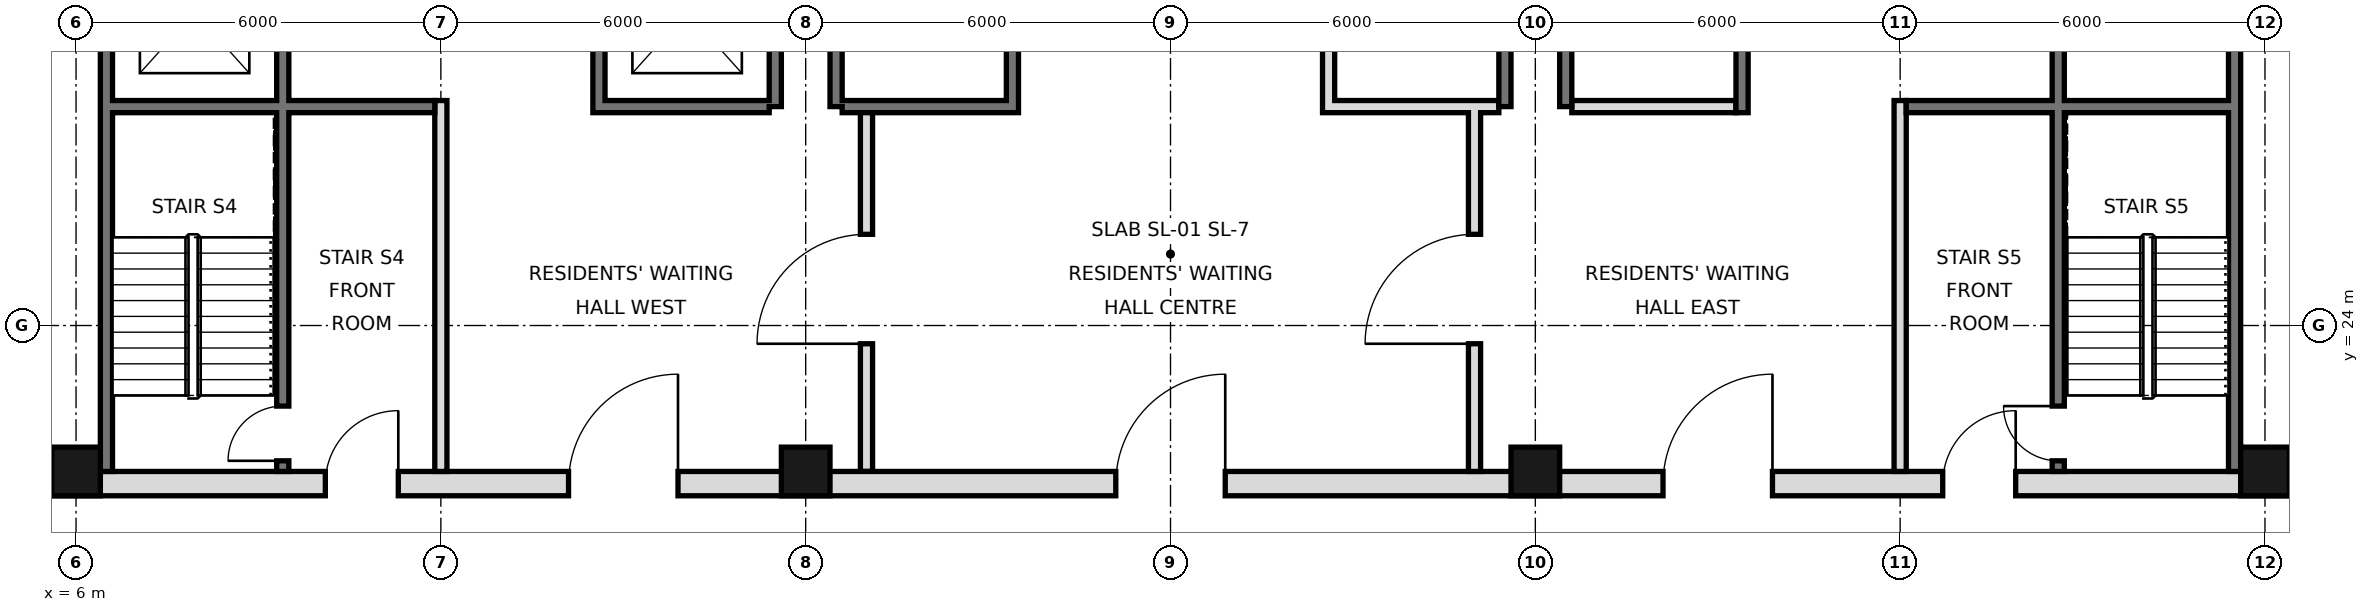
"""IFC4 building model, lengths in metres.
Left out: names, types, materials, properties, quantities, classifications, styles, units other than length and angle.
Written with IfcOpenShell. Run it as: python <this file> out.ifc"""

import sys

from ifc_helpers import new_model, si_unit, direction, frame, frame_2d, origin, origin_2d, place, context, subcontext, project, spatial, rectangle, hollow_rectangle, extrude, element, fill, save


model = new_model("IFC4")
c1 = context("Model", 3, precision=1e-05, world=origin(), true_north=direction((0.0, 1.0)))
c2 = subcontext(c1, "Body", "Model", "MODEL_VIEW")
j1 = project(units=[si_unit("LENGTHUNIT", "METRE"), si_unit("PLANEANGLEUNIT", "RADIAN")], contexts=[c1])
p1 = place(None, origin())
s1 = spatial("IfcSite", under=j1, at=p1, CompositionType="ELEMENT")
p2 = place(p1, origin())
s2 = spatial("IfcBuilding", under=s1, at=p2, CompositionType="ELEMENT")
p3 = place(p2, frame((0.0, 0.0, 53.4)))
s3 = spatial("IfcBuildingStorey", under=s2, at=p3, CompositionType="ELEMENT", Elevation=53.4)
for number, where, z_axis, x_axis in (
    (1, (6.0, 21.6, 0.0), (0.0, 0.0, 1.0), (1.0, 0.0, 0.0)),
    (2, (18.0, 21.6, 0.0), (0.0, 0.0, 1.0), (1.0, 0.0, 0.0)),
    (3, (30.0, 21.6, 0.0), (0.0, 0.0, 1.0), (1.0, 0.0, 0.0)),
    (4, (42.0, 21.6, 0.0), (0.0, 0.0, 1.0), (1.0, 0.0, 0.0)),
):
    element("IfcColumn", number, at=place(p3, frame(where, z_axis=z_axis, x_axis=x_axis)), inside=s3, PredefinedType="COLUMN", context=c2, shape_type="SweptSolid", body=[
        extrude(hollow_rectangle(XDim=0.8, YDim=0.8, WallThickness=0.06, at=origin_2d()), origin(), (0.0, 0.0, 1.0), 3.6),
    ])
for number, where, z_axis, x_axis in (
    (5, (6.5, 21.6, 0.0), (0.0, 0.0, 1.0), (0.0, 1.0, 0.0)),
    (6, (41.5, 21.6, 0.0), (0.0, 0.0, 1.0), (0.0, 1.0, 0.0)),
):
    element("IfcWall", number, at=place(p3, frame(where, z_axis=z_axis, x_axis=x_axis)), inside=s3, PredefinedType="SOLIDWALL", context=c2, shape_type="SweptSolid", body=[
        extrude(rectangle(XDim=23.5, YDim=0.2, at=frame_2d((11.75, 0.0))), origin(), (0.0, 0.0, 1.0), 3.42),
    ])
for number, where, z_axis, x_axis in (
    (7, (17.5, 27.6, 0.0), (0.0, 0.0, 1.0), (0.0, 1.0, 0.0)),
    (8, (18.5, 27.6, 0.0), (0.0, 0.0, 1.0), (0.0, 1.0, 0.0)),
    (9, (29.5, 27.6, 0.0), (0.0, 0.0, 1.0), (0.0, 1.0, 0.0)),
    (10, (30.5, 27.6, 0.0), (0.0, 0.0, 1.0), (0.0, 1.0, 0.0)),
):
    element("IfcWall", number, at=place(p3, frame(where, z_axis=z_axis, x_axis=x_axis)), inside=s3, PredefinedType="SOLIDWALL", context=c2, shape_type="SweptSolid", body=[
        extrude(rectangle(XDim=17.5, YDim=0.2, at=frame_2d((8.75, 0.0))), origin(), (0.0, 0.0, 1.0), 3.42),
    ])
p4 = place(p3, frame((5.6, 21.4, 0.0), z_axis=(0.0, 0.0, 1.0), x_axis=(1.0, 0.0, 0.0)))
e11 = element("IfcWall", 11, at=p4, inside=s3, PredefinedType="SOLIDWALL", context=c2, shape_type="SweptSolid", body=[
    extrude(rectangle(XDim=36.8, YDim=0.4, at=frame_2d((18.4, 0.0))), origin(), (0.0, 0.0, 1.0), 3.42),
])
p5 = place(p4, frame((8.5, 0.0, 0.0)))
e12 = element("IfcOpeningElement", 12, at=p5, cuts=e11, PredefinedType="OPENING", context=c2, shape_type="SweptSolid", body=[
    extrude(rectangle(XDim=1.8, YDim=2.1, at=frame_2d((0.9, 1.05))), frame((0.0, 0.21, 0.0), z_axis=(0.0, -1.0, 0.0), x_axis=(1.0, 0.0, 0.0)), (0.0, 0.0, 1.0), 0.42),
])
p6 = place(p4, frame((17.5, 0.0, 0.0)))
e13 = element("IfcOpeningElement", 13, at=p6, cuts=e11, PredefinedType="OPENING", context=c2, shape_type="SweptSolid", body=[
    extrude(rectangle(XDim=1.8, YDim=2.1, at=frame_2d((0.9, 1.05))), frame((0.0, 0.21, 0.0), z_axis=(0.0, -1.0, 0.0), x_axis=(1.0, 0.0, 0.0)), (0.0, 0.0, 1.0), 0.42),
])
p7 = place(p4, frame((26.5, 0.0, 0.0)))
e14 = element("IfcOpeningElement", 14, at=p7, cuts=e11, PredefinedType="OPENING", context=c2, shape_type="SweptSolid", body=[
    extrude(rectangle(XDim=1.8, YDim=2.1, at=frame_2d((0.9, 1.05))), frame((0.0, 0.21, 0.0), z_axis=(0.0, -1.0, 0.0), x_axis=(1.0, 0.0, 0.0)), (0.0, 0.0, 1.0), 0.42),
])
p8 = place(p4, frame((4.5, 0.0, 0.0)))
e15 = element("IfcOpeningElement", 15, at=p8, cuts=e11, PredefinedType="OPENING", context=c2, shape_type="SweptSolid", body=[
    extrude(rectangle(XDim=1.2, YDim=2.1, at=frame_2d((0.6, 1.05))), frame((0.0, 0.21, 0.0), z_axis=(0.0, -1.0, 0.0), x_axis=(1.0, 0.0, 0.0)), (0.0, 0.0, 1.0), 0.42),
])
p9 = place(p4, frame((31.1, 0.0, 0.0)))
e16 = element("IfcOpeningElement", 16, at=p9, cuts=e11, PredefinedType="OPENING", context=c2, shape_type="SweptSolid", body=[
    extrude(rectangle(XDim=1.2, YDim=2.1, at=frame_2d((0.6, 1.05))), frame((0.0, 0.21, 0.0), z_axis=(0.0, -1.0, 0.0), x_axis=(1.0, 0.0, 0.0)), (0.0, 0.0, 1.0), 0.42),
])
p10 = place(p3, frame((19.0, 21.6, 0.0), z_axis=(0.0, 0.0, 1.0), x_axis=(0.0, 1.0, 0.0)))
e17 = element("IfcWall", 17, at=p10, inside=s3, PredefinedType="PARTITIONING", context=c2, shape_type="SweptSolid", body=[
    extrude(rectangle(XDim=6.0, YDim=0.2, at=frame_2d((3.0, 0.0))), origin(), (0.0, 0.0, 1.0), 3.42),
])
p11 = place(p10, frame((2.1, 0.0, 0.0)))
e18 = element("IfcOpeningElement", 18, at=p11, cuts=e17, PredefinedType="OPENING", context=c2, shape_type="SweptSolid", body=[
    extrude(rectangle(XDim=1.8, YDim=2.1, at=frame_2d((0.9, 1.05))), frame((0.0, 0.11, 0.0), z_axis=(0.0, -1.0, 0.0), x_axis=(1.0, 0.0, 0.0)), (0.0, 0.0, 1.0), 0.22),
])
p12 = place(p3, frame((29.0, 21.6, 0.0), z_axis=(0.0, 0.0, 1.0), x_axis=(0.0, 1.0, 0.0)))
e19 = element("IfcWall", 19, at=p12, inside=s3, PredefinedType="PARTITIONING", context=c2, shape_type="SweptSolid", body=[
    extrude(rectangle(XDim=6.0, YDim=0.2, at=frame_2d((3.0, 0.0))), origin(), (0.0, 0.0, 1.0), 3.42),
])
p13 = place(p12, frame((2.1, 0.0, 0.0)))
e20 = element("IfcOpeningElement", 20, at=p13, cuts=e19, PredefinedType="OPENING", context=c2, shape_type="SweptSolid", body=[
    extrude(rectangle(XDim=1.8, YDim=2.1, at=frame_2d((0.9, 1.05))), frame((0.0, 0.11, 0.0), z_axis=(0.0, -1.0, 0.0), x_axis=(1.0, 0.0, 0.0)), (0.0, 0.0, 1.0), 0.22),
])
p14 = place(p3, frame((12.0, 21.6, 0.0), z_axis=(0.0, 0.0, 1.0), x_axis=(0.0, 1.0, 0.0)))
e21 = element("IfcWall", 21, at=p14, inside=s3, PredefinedType="PARTITIONING", context=c2, shape_type="SweptSolid", body=[
    extrude(rectangle(XDim=6.1, YDim=0.2, at=frame_2d((3.05, 0.0))), origin(), (0.0, 0.0, 1.0), 3.42),
])
p15 = place(p3, frame((14.6, 27.5, 0.0), z_axis=(0.0, 0.0, 1.0), x_axis=(0.0, 1.0, 0.0)))
e22 = element("IfcWall", 22, at=p15, inside=s3, PredefinedType="SOLIDWALL", context=c2, shape_type="SweptSolid", body=[
    extrude(rectangle(XDim=17.5, YDim=0.2, at=frame_2d((8.75, 0.0))), origin(), (0.0, 0.0, 1.0), 3.42),
])
p16 = place(p15, frame((1.1, 0.0, 0.0)))
e23 = element("IfcOpeningElement", 23, at=p16, cuts=e22, PredefinedType="OPENING", context=c2, shape_type="SweptSolid", body=[
    extrude(rectangle(XDim=1.1, YDim=2.1, at=frame_2d((0.55, 1.05))), frame((0.0, 0.11, 0.0), z_axis=(0.0, -1.0, 0.0), x_axis=(1.0, 0.0, 0.0)), (0.0, 0.0, 1.0), 0.22),
])
p17 = place(p15, frame((4.2, 0.0, 0.0)))
e24 = element("IfcOpeningElement", 24, at=p17, cuts=e22, PredefinedType="OPENING", context=c2, shape_type="SweptSolid", body=[
    extrude(rectangle(XDim=1.1, YDim=2.1, at=frame_2d((0.55, 1.05))), frame((0.0, 0.11, 0.0), z_axis=(0.0, -1.0, 0.0), x_axis=(1.0, 0.0, 0.0)), (0.0, 0.0, 1.0), 0.22),
])
p18 = place(p15, frame((15.4, 0.0, 0.0)))
e25 = element("IfcOpeningElement", 25, at=p18, cuts=e22, PredefinedType="OPENING", context=c2, shape_type="SweptSolid", body=[
    extrude(rectangle(XDim=1.1, YDim=2.1, at=frame_2d((0.55, 1.05))), frame((0.0, 0.11, 0.0), z_axis=(0.0, -1.0, 0.0), x_axis=(1.0, 0.0, 0.0)), (0.0, 0.0, 1.0), 0.22),
])
p19 = place(p15, frame((9.9, 0.0, 0.0)))
e26 = element("IfcOpeningElement", 26, at=p19, cuts=e22, PredefinedType="OPENING", context=c2, shape_type="SweptSolid", body=[
    extrude(rectangle(XDim=0.9, YDim=2.1, at=frame_2d((0.45, 1.05))), frame((0.0, 0.11, 0.0), z_axis=(0.0, -1.0, 0.0), x_axis=(1.0, 0.0, 0.0)), (0.0, 0.0, 1.0), 0.22),
])
p20 = place(p3, frame((21.4, 27.5, 0.0), z_axis=(0.0, 0.0, 1.0), x_axis=(0.0, 1.0, 0.0)))
e27 = element("IfcWall", 27, at=p20, inside=s3, PredefinedType="SOLIDWALL", context=c2, shape_type="SweptSolid", body=[
    extrude(rectangle(XDim=17.5, YDim=0.2, at=frame_2d((8.75, 0.0))), origin(), (0.0, 0.0, 1.0), 3.42),
])
p21 = place(p20, frame((9.8, 0.0, 0.0)))
e28 = element("IfcOpeningElement", 28, at=p21, cuts=e27, PredefinedType="OPENING", context=c2, shape_type="SweptSolid", body=[
    extrude(rectangle(XDim=1.0, YDim=2.1, at=frame_2d((0.5, 1.05))), frame((0.0, 0.11, 0.0), z_axis=(0.0, -1.0, 0.0), x_axis=(1.0, 0.0, 0.0)), (0.0, 0.0, 1.0), 0.22),
])
p22 = place(p20, frame((7.4, 0.0, 0.0)))
e29 = element("IfcOpeningElement", 29, at=p22, cuts=e27, PredefinedType="OPENING", context=c2, shape_type="SweptSolid", body=[
    extrude(rectangle(XDim=0.9, YDim=2.1, at=frame_2d((0.45, 1.05))), frame((0.0, 0.11, 0.0), z_axis=(0.0, -1.0, 0.0), x_axis=(1.0, 0.0, 0.0)), (0.0, 0.0, 1.0), 0.22),
])
p23 = place(p3, frame((26.6, 27.5, 0.0), z_axis=(0.0, 0.0, 1.0), x_axis=(0.0, 1.0, 0.0)))
e30 = element("IfcWall", 30, at=p23, inside=s3, PredefinedType="SOLIDWALL", context=c2, shape_type="SweptSolid", body=[
    extrude(rectangle(XDim=17.5, YDim=0.2, at=frame_2d((8.75, 0.0))), origin(), (0.0, 0.0, 1.0), 3.42),
])
p24 = place(p23, frame((4.3, 0.0, 0.0)))
e31 = element("IfcOpeningElement", 31, at=p24, cuts=e30, PredefinedType="OPENING", context=c2, shape_type="SweptSolid", body=[
    extrude(rectangle(XDim=0.9, YDim=2.1, at=frame_2d((0.45, 1.05))), frame((0.0, 0.11, 0.0), z_axis=(0.0, -1.0, 0.0), x_axis=(1.0, 0.0, 0.0)), (0.0, 0.0, 1.0), 0.22),
])
p25 = place(p23, frame((10.35, 0.0, 0.0)))
e32 = element("IfcOpeningElement", 32, at=p25, cuts=e30, PredefinedType="OPENING", context=c2, shape_type="SweptSolid", body=[
    extrude(rectangle(XDim=1.0, YDim=2.1, at=frame_2d((0.5, 1.05))), frame((0.0, 0.11, 0.0), z_axis=(0.0, -1.0, 0.0), x_axis=(1.0, 0.0, 0.0)), (0.0, 0.0, 1.0), 0.22),
])
p26 = place(p23, frame((15.475, 0.0, 0.0)))
e33 = element("IfcOpeningElement", 33, at=p26, cuts=e30, PredefinedType="OPENING", context=c2, shape_type="SweptSolid", body=[
    extrude(rectangle(XDim=1.0, YDim=2.1, at=frame_2d((0.5, 1.05))), frame((0.0, 0.11, 0.0), z_axis=(0.0, -1.0, 0.0), x_axis=(1.0, 0.0, 0.0)), (0.0, 0.0, 1.0), 0.22),
])
p27 = place(p3, frame((33.4, 27.5, 0.0), z_axis=(0.0, 0.0, 1.0), x_axis=(0.0, 1.0, 0.0)))
e34 = element("IfcWall", 34, at=p27, inside=s3, PredefinedType="SOLIDWALL", context=c2, shape_type="SweptSolid", body=[
    extrude(rectangle(XDim=17.5, YDim=0.2, at=frame_2d((8.75, 0.0))), origin(), (0.0, 0.0, 1.0), 3.42),
])
p28 = place(p27, frame((15.4, 0.0, 0.0)))
e35 = element("IfcOpeningElement", 35, at=p28, cuts=e34, PredefinedType="OPENING", context=c2, shape_type="SweptSolid", body=[
    extrude(rectangle(XDim=1.1, YDim=2.1, at=frame_2d((0.55, 1.05))), frame((0.0, 0.11, 0.0), z_axis=(0.0, -1.0, 0.0), x_axis=(1.0, 0.0, 0.0)), (0.0, 0.0, 1.0), 0.22),
])
p29 = place(p27, frame((2.7, 0.0, 0.0)))
e36 = element("IfcOpeningElement", 36, at=p29, cuts=e34, PredefinedType="OPENING", context=c2, shape_type="SweptSolid", body=[
    extrude(rectangle(XDim=1.0, YDim=2.1, at=frame_2d((0.5, 1.05))), frame((0.0, 0.11, 0.0), z_axis=(0.0, -1.0, 0.0), x_axis=(1.0, 0.0, 0.0)), (0.0, 0.0, 1.0), 0.22),
])
p30 = place(p27, frame((9.9, 0.0, 0.0)))
e37 = element("IfcOpeningElement", 37, at=p30, cuts=e34, PredefinedType="OPENING", context=c2, shape_type="SweptSolid", body=[
    extrude(rectangle(XDim=0.9, YDim=2.1, at=frame_2d((0.45, 1.05))), frame((0.0, 0.11, 0.0), z_axis=(0.0, -1.0, 0.0), x_axis=(1.0, 0.0, 0.0)), (0.0, 0.0, 1.0), 0.22),
])
p31 = place(p3, frame((36.0, 21.6, 0.0), z_axis=(0.0, 0.0, 1.0), x_axis=(0.0, 1.0, 0.0)))
e38 = element("IfcWall", 38, at=p31, inside=s3, PredefinedType="PARTITIONING", context=c2, shape_type="SweptSolid", body=[
    extrude(rectangle(XDim=6.1, YDim=0.2, at=frame_2d((3.05, 0.0))), origin(), (0.0, 0.0, 1.0), 3.42),
])
p32 = place(p3, frame((38.6, 21.6, 0.0), z_axis=(0.0, 0.0, 1.0), x_axis=(0.0, 1.0, 0.0)))
e39 = element("IfcWall", 39, at=p32, inside=s3, PredefinedType="SOLIDWALL", context=c2, shape_type="SweptSolid", body=[
    extrude(rectangle(XDim=23.4, YDim=0.2, at=frame_2d((11.7, 0.0))), origin(), (0.0, 0.0, 1.0), 3.42),
])
p33 = place(p32, frame((8.6, 0.0, 0.0)))
e40 = element("IfcOpeningElement", 40, at=p33, cuts=e39, PredefinedType="OPENING", context=c2, shape_type="SweptSolid", body=[
    extrude(rectangle(XDim=1.0, YDim=2.1, at=frame_2d((0.5, 1.05))), frame((0.0, 0.11, 0.0), z_axis=(0.0, -1.0, 0.0), x_axis=(1.0, 0.0, 0.0)), (0.0, 0.0, 1.0), 0.22),
])
p34 = place(p32, frame((13.25, 0.0, 0.0)))
e41 = element("IfcOpeningElement", 41, at=p34, cuts=e39, PredefinedType="OPENING", context=c2, shape_type="SweptSolid", body=[
    extrude(rectangle(XDim=1.0, YDim=2.1, at=frame_2d((0.5, 1.05))), frame((0.0, 0.11, 0.0), z_axis=(0.0, -1.0, 0.0), x_axis=(1.0, 0.0, 0.0)), (0.0, 0.0, 1.0), 0.22),
])
p35 = place(p32, frame((15.7, 0.0, 0.0)))
e42 = element("IfcOpeningElement", 42, at=p35, cuts=e39, PredefinedType="OPENING", context=c2, shape_type="SweptSolid", body=[
    extrude(rectangle(XDim=1.0, YDim=2.1, at=frame_2d((0.5, 1.05))), frame((0.0, 0.11, 0.0), z_axis=(0.0, -1.0, 0.0), x_axis=(1.0, 0.0, 0.0)), (0.0, 0.0, 1.0), 0.22),
])
p36 = place(p32, frame((0.175, 0.0, 0.0)))
e43 = element("IfcOpeningElement", 43, at=p36, cuts=e39, PredefinedType="OPENING", context=c2, shape_type="SweptSolid", body=[
    extrude(rectangle(XDim=0.9, YDim=2.1, at=frame_2d((0.45, 1.05))), frame((0.0, 0.11, 0.0), z_axis=(0.0, -1.0, 0.0), x_axis=(1.0, 0.0, 0.0)), (0.0, 0.0, 1.0), 0.22),
])
p37 = place(p3, frame((9.4, 21.6, 0.0), z_axis=(0.0, 0.0, 1.0), x_axis=(0.0, 1.0, 0.0)))
e44 = element("IfcWall", 44, at=p37, inside=s3, PredefinedType="SOLIDWALL", context=c2, shape_type="SweptSolid", body=[
    extrude(rectangle(XDim=23.4, YDim=0.2, at=frame_2d((11.7, 0.0))), origin(), (0.0, 0.0, 1.0), 3.42),
])
p38 = place(p37, frame((7.0, 0.0, 0.0)))
e45 = element("IfcOpeningElement", 45, at=p38, cuts=e44, PredefinedType="OPENING", context=c2, shape_type="SweptSolid", body=[
    extrude(rectangle(XDim=1.1, YDim=2.1, at=frame_2d((0.55, 1.05))), frame((0.0, 0.11, 0.0), z_axis=(0.0, -1.0, 0.0), x_axis=(1.0, 0.0, 0.0)), (0.0, 0.0, 1.0), 0.22),
])
p39 = place(p37, frame((10.1, 0.0, 0.0)))
e46 = element("IfcOpeningElement", 46, at=p39, cuts=e44, PredefinedType="OPENING", context=c2, shape_type="SweptSolid", body=[
    extrude(rectangle(XDim=1.1, YDim=2.1, at=frame_2d((0.55, 1.05))), frame((0.0, 0.11, 0.0), z_axis=(0.0, -1.0, 0.0), x_axis=(1.0, 0.0, 0.0)), (0.0, 0.0, 1.0), 0.22),
])
p40 = place(p37, frame((13.2, 0.0, 0.0)))
e47 = element("IfcOpeningElement", 47, at=p40, cuts=e44, PredefinedType="OPENING", context=c2, shape_type="SweptSolid", body=[
    extrude(rectangle(XDim=1.1, YDim=2.1, at=frame_2d((0.55, 1.05))), frame((0.0, 0.11, 0.0), z_axis=(0.0, -1.0, 0.0), x_axis=(1.0, 0.0, 0.0)), (0.0, 0.0, 1.0), 0.22),
])
p41 = place(p37, frame((15.7, 0.0, 0.0)))
e48 = element("IfcOpeningElement", 48, at=p41, cuts=e44, PredefinedType="OPENING", context=c2, shape_type="SweptSolid", body=[
    extrude(rectangle(XDim=1.0, YDim=2.1, at=frame_2d((0.5, 1.05))), frame((0.0, 0.11, 0.0), z_axis=(0.0, -1.0, 0.0), x_axis=(1.0, 0.0, 0.0)), (0.0, 0.0, 1.0), 0.22),
])
p42 = place(p37, frame((0.175, 0.0, 0.0)))
e49 = element("IfcOpeningElement", 49, at=p42, cuts=e44, PredefinedType="OPENING", context=c2, shape_type="SweptSolid", body=[
    extrude(rectangle(XDim=0.9, YDim=2.1, at=frame_2d((0.45, 1.05))), frame((0.0, 0.11, 0.0), z_axis=(0.0, -1.0, 0.0), x_axis=(1.0, 0.0, 0.0)), (0.0, 0.0, 1.0), 0.22),
])
for number, where, z_axis, x_axis in (
    (50, (14.7, 27.6, 0.0), (0.0, 0.0, 1.0), (1.0, 0.0, 0.0)),
    (51, (18.6, 27.6, 0.0), (0.0, 0.0, 1.0), (1.0, 0.0, 0.0)),
    (52, (26.7, 27.6, 0.0), (0.0, 0.0, 1.0), (1.0, 0.0, 0.0)),
):
    element("IfcWall", number, at=place(p3, frame(where, z_axis=z_axis, x_axis=x_axis)), inside=s3, PredefinedType="SOLIDWALL", context=c2, shape_type="SweptSolid", body=[
        extrude(rectangle(XDim=2.7, YDim=0.2, at=frame_2d((1.35, 0.0))), origin(), (0.0, 0.0, 1.0), 3.42),
    ])
p43 = place(p3, frame((30.6, 27.6, 0.0), z_axis=(0.0, 0.0, 1.0), x_axis=(1.0, 0.0, 0.0)))
e53 = element("IfcWall", 53, at=p43, inside=s3, PredefinedType="PARTITIONING", context=c2, shape_type="SweptSolid", body=[
    extrude(rectangle(XDim=2.7, YDim=0.2, at=frame_2d((1.35, 0.0))), origin(), (0.0, 0.0, 1.0), 3.42),
])
for number, where, z_axis, x_axis in (
    (54, (36.1, 27.6, 0.0), (0.0, 0.0, 1.0), (1.0, 0.0, 0.0)),
    (55, (6.6, 27.6, 0.0), (0.0, 0.0, 1.0), (1.0, 0.0, 0.0)),
):
    element("IfcWall", number, at=place(p3, frame(where, z_axis=z_axis, x_axis=x_axis)), inside=s3, PredefinedType="SOLIDWALL", context=c2, shape_type="SweptSolid", body=[
        extrude(rectangle(XDim=5.3, YDim=0.2, at=frame_2d((2.65, 0.0))), origin(), (0.0, 0.0, 1.0), 3.42),
    ])
p44 = place(p5, frame((1.8, 0.0, 0.0), z_axis=(0.0, 0.0, 1.0), x_axis=(-1.0, 0.0, 0.0)))
e56 = element("IfcDoor", 56, at=p44, inside=s3, OperationType="SINGLE_SWING_LEFT", PredefinedType="DOOR", context=c2, shape_type="SweptSolid", body=[
    extrude(rectangle(XDim=1.8, YDim=2.1, at=frame_2d((0.9, 1.05))), frame((0.0, 0.025, 0.0), z_axis=(0.0, -1.0, 0.0), x_axis=(1.0, 0.0, 0.0)), (0.0, 0.0, 1.0), 0.05),
])
fill(e12, e56)
p45 = place(p11, origin())
e57 = element("IfcDoor", 57, at=p45, inside=s3, OperationType="SINGLE_SWING_LEFT", PredefinedType="DOOR", context=c2, shape_type="SweptSolid", body=[
    extrude(rectangle(XDim=1.8, YDim=2.1, at=frame_2d((0.9, 1.05))), frame((0.0, 0.025, 0.0), z_axis=(0.0, -1.0, 0.0), x_axis=(1.0, 0.0, 0.0)), (0.0, 0.0, 1.0), 0.05),
])
fill(e18, e57)
p46 = place(p6, frame((1.8, 0.0, 0.0), z_axis=(0.0, 0.0, 1.0), x_axis=(-1.0, 0.0, 0.0)))
e58 = element("IfcDoor", 58, at=p46, inside=s3, OperationType="SINGLE_SWING_LEFT", PredefinedType="DOOR", context=c2, shape_type="SweptSolid", body=[
    extrude(rectangle(XDim=1.8, YDim=2.1, at=frame_2d((0.9, 1.05))), frame((0.0, 0.025, 0.0), z_axis=(0.0, -1.0, 0.0), x_axis=(1.0, 0.0, 0.0)), (0.0, 0.0, 1.0), 0.05),
])
fill(e13, e58)
p47 = place(p13, origin())
e59 = element("IfcDoor", 59, at=p47, inside=s3, OperationType="SINGLE_SWING_LEFT", PredefinedType="DOOR", context=c2, shape_type="SweptSolid", body=[
    extrude(rectangle(XDim=1.8, YDim=2.1, at=frame_2d((0.9, 1.05))), frame((0.0, 0.025, 0.0), z_axis=(0.0, -1.0, 0.0), x_axis=(1.0, 0.0, 0.0)), (0.0, 0.0, 1.0), 0.05),
])
fill(e20, e59)
p48 = place(p7, frame((1.8, 0.0, 0.0), z_axis=(0.0, 0.0, 1.0), x_axis=(-1.0, 0.0, 0.0)))
e60 = element("IfcDoor", 60, at=p48, inside=s3, OperationType="SINGLE_SWING_LEFT", PredefinedType="DOOR", context=c2, shape_type="SweptSolid", body=[
    extrude(rectangle(XDim=1.8, YDim=2.1, at=frame_2d((0.9, 1.05))), frame((0.0, 0.025, 0.0), z_axis=(0.0, -1.0, 0.0), x_axis=(1.0, 0.0, 0.0)), (0.0, 0.0, 1.0), 0.05),
])
fill(e14, e60)
p49 = place(p8, frame((1.2, 0.0, 0.0), z_axis=(0.0, 0.0, 1.0), x_axis=(-1.0, 0.0, 0.0)))
e61 = element("IfcDoor", 61, at=p49, inside=s3, OperationType="SINGLE_SWING_LEFT", PredefinedType="DOOR", context=c2, shape_type="SweptSolid", body=[
    extrude(rectangle(XDim=1.2, YDim=2.1, at=frame_2d((0.6, 1.05))), frame((0.0, 0.025, 0.0), z_axis=(0.0, -1.0, 0.0), x_axis=(1.0, 0.0, 0.0)), (0.0, 0.0, 1.0), 0.05),
])
fill(e15, e61)
p50 = place(p9, frame((1.2, 0.0, 0.0), z_axis=(0.0, 0.0, 1.0), x_axis=(-1.0, 0.0, 0.0)))
e62 = element("IfcDoor", 62, at=p50, inside=s3, OperationType="SINGLE_SWING_LEFT", PredefinedType="DOOR", context=c2, shape_type="SweptSolid", body=[
    extrude(rectangle(XDim=1.2, YDim=2.1, at=frame_2d((0.6, 1.05))), frame((0.0, 0.025, 0.0), z_axis=(0.0, -1.0, 0.0), x_axis=(1.0, 0.0, 0.0)), (0.0, 0.0, 1.0), 0.05),
])
fill(e16, e62)
p51 = place(p42, origin())
e63 = element("IfcDoor", 63, at=p51, inside=s3, OperationType="SINGLE_SWING_LEFT", PredefinedType="DOOR", context=c2, shape_type="SweptSolid", body=[
    extrude(rectangle(XDim=0.9, YDim=2.1, at=frame_2d((0.45, 1.05))), frame((0.0, 0.025, 0.0), z_axis=(0.0, -1.0, 0.0), x_axis=(1.0, 0.0, 0.0)), (0.0, 0.0, 1.0), 0.05),
])
fill(e49, e63)
p52 = place(p36, frame((0.9, 0.0, 0.0), z_axis=(0.0, 0.0, 1.0), x_axis=(-1.0, 0.0, 0.0)))
e64 = element("IfcDoor", 64, at=p52, inside=s3, OperationType="SINGLE_SWING_LEFT", PredefinedType="DOOR", context=c2, shape_type="SweptSolid", body=[
    extrude(rectangle(XDim=0.9, YDim=2.1, at=frame_2d((0.45, 1.05))), frame((0.0, 0.025, 0.0), z_axis=(0.0, -1.0, 0.0), x_axis=(1.0, 0.0, 0.0)), (0.0, 0.0, 1.0), 0.05),
])
fill(e43, e64)
save(model, sys.argv[1])
